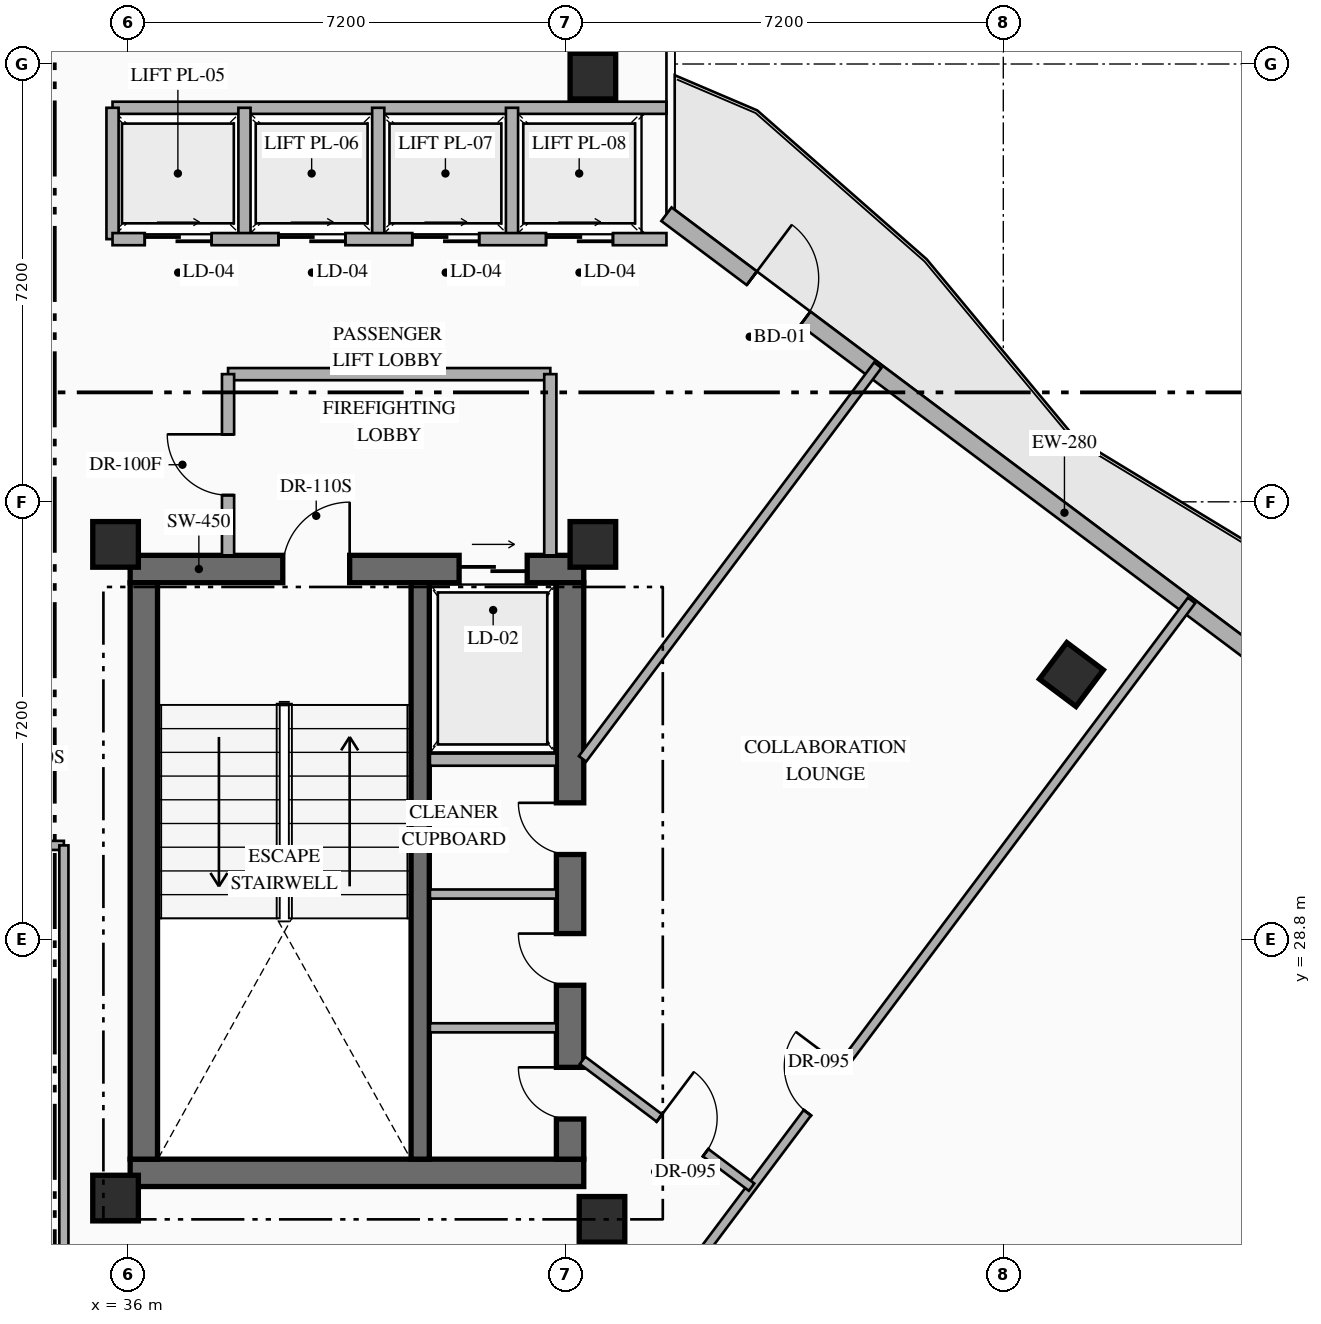
"""IFC4 building model, lengths in metres.
Left out: names, types, materials, properties, quantities, classifications, styles, units other than length and angle.
Written with IfcOpenShell. Run it as: python <this file> out.ifc"""

import sys

from ifc_helpers import new_model, si_unit, direction, frame, frame_2d, origin, origin_2d, place, context, subcontext, project, spatial, rectangle, hollow_rectangle, extrude, element, fill, save


model = new_model("IFC4")
c1 = context("Model", 3, precision=1e-05, world=origin(), true_north=direction((0.0, 1.0)))
c2 = subcontext(c1, "Body", "Model", "MODEL_VIEW")
j1 = project(units=[si_unit("LENGTHUNIT", "METRE"), si_unit("PLANEANGLEUNIT", "RADIAN")], contexts=[c1])
p1 = place(None, origin())
s1 = spatial("IfcSite", under=j1, at=p1, CompositionType="ELEMENT")
p2 = place(p1, origin())
s2 = spatial("IfcBuilding", under=s1, at=p2, CompositionType="ELEMENT")
p3 = place(p2, frame((0.0, 0.0, 205.95)))
s3 = spatial("IfcBuildingStorey", under=s2, at=p3, CompositionType="ELEMENT", Elevation=205.95)
p4 = place(p3, frame((36.04, 24.965, 0.0), z_axis=(0.0, 0.0, 1.0), x_axis=(1.0, 0.0, 0.0)))
e1 = element("IfcWall", 1, at=p4, inside=s3, PredefinedType="SHEAR", context=c2, shape_type="SweptSolid", body=[
    extrude(rectangle(XDim=7.46, YDim=0.45, at=frame_2d((3.73, 0.0))), origin(), (0.0, 0.0, 1.0), 3.6),
])
p5 = place(p3, frame((36.04, 34.895, 0.0), z_axis=(0.0, 0.0, 1.0), x_axis=(1.0, 0.0, 0.0)))
e2 = element("IfcWall", 2, at=p5, inside=s3, PredefinedType="SHEAR", context=c2, shape_type="SweptSolid", body=[
    extrude(rectangle(XDim=7.46, YDim=0.45, at=frame_2d((3.73, 0.0))), origin(), (0.0, 0.0, 1.0), 3.6),
])
p6 = place(p5, frame((2.51, 0.0, 0.0)))
e3 = element("IfcOpeningElement", 3, at=p6, cuts=e2, PredefinedType="OPENING", context=c2, shape_type="SweptSolid", body=[
    extrude(rectangle(XDim=1.1, YDim=2.2, at=frame_2d((0.55, 1.1))), frame((0.0, 0.235, 0.0), z_axis=(0.0, -1.0, 0.0), x_axis=(1.0, 0.0, 0.0)), (0.0, 0.0, 1.0), 0.47),
])
p7 = place(p5, frame((5.41, 0.0, 0.0)))
e4 = element("IfcOpeningElement", 4, at=p7, cuts=e2, PredefinedType="OPENING", context=c2, shape_type="SweptSolid", body=[
    extrude(rectangle(XDim=1.12, YDim=2.15, at=frame_2d((0.56, 1.075))), frame((0.0, 0.235, 0.0), z_axis=(0.0, -1.0, 0.0), x_axis=(1.0, 0.0, 0.0)), (0.0, 0.0, 1.0), 0.47),
])
p8 = place(p3, frame((36.265, 25.19, 0.0), z_axis=(0.0, 0.0, 1.0), x_axis=(0.0, 1.0, 0.0)))
e5 = element("IfcWall", 5, at=p8, inside=s3, PredefinedType="SHEAR", context=c2, shape_type="SweptSolid", body=[
    extrude(rectangle(XDim=9.48, YDim=0.45, at=frame_2d((4.74, 0.0))), origin(), (0.0, 0.0, 1.0), 3.6),
])
p9 = place(p3, frame((43.275, 25.19, 0.0), z_axis=(0.0, 0.0, 1.0), x_axis=(0.0, 1.0, 0.0)))
e6 = element("IfcWall", 6, at=p9, inside=s3, PredefinedType="SHEAR", context=c2, shape_type="SweptSolid", body=[
    extrude(rectangle(XDim=9.48, YDim=0.45, at=frame_2d((4.74, 0.0))), origin(), (0.0, 0.0, 1.0), 3.6),
])
p10 = place(p9, frame((0.66, 0.0, 0.0)))
e7 = element("IfcOpeningElement", 7, at=p10, cuts=e6, PredefinedType="OPENING", context=c2, shape_type="SweptSolid", body=[
    extrude(rectangle(XDim=0.85, YDim=2.08, at=frame_2d((0.425, 1.04))), frame((0.0, 0.235, 0.0), z_axis=(0.0, -1.0, 0.0), x_axis=(1.0, 0.0, 0.0)), (0.0, 0.0, 1.0), 0.47),
])
p11 = place(p9, frame((2.86, 0.0, 0.0)))
e8 = element("IfcOpeningElement", 8, at=p11, cuts=e6, PredefinedType="OPENING", context=c2, shape_type="SweptSolid", body=[
    extrude(rectangle(XDim=0.85, YDim=2.08, at=frame_2d((0.425, 1.04))), frame((0.0, 0.235, 0.0), z_axis=(0.0, -1.0, 0.0), x_axis=(1.0, 0.0, 0.0)), (0.0, 0.0, 1.0), 0.47),
])
p12 = place(p9, frame((5.01, 0.0, 0.0)))
e9 = element("IfcOpeningElement", 9, at=p12, cuts=e6, PredefinedType="OPENING", context=c2, shape_type="SweptSolid", body=[
    extrude(rectangle(XDim=0.85, YDim=2.08, at=frame_2d((0.425, 1.04))), frame((0.0, 0.235, 0.0), z_axis=(0.0, -1.0, 0.0), x_axis=(1.0, 0.0, 0.0)), (0.0, 0.0, 1.0), 0.47),
])
p13 = place(p3, frame((40.81, 25.19, 0.0), z_axis=(0.0, 0.0, 1.0), x_axis=(0.0, 1.0, 0.0)))
e10 = element("IfcWall", 10, at=p13, inside=s3, PredefinedType="SHEAR", context=c2, shape_type="SweptSolid", body=[
    extrude(rectangle(XDim=9.48, YDim=0.3, at=frame_2d((4.74, 0.0))), origin(), (0.0, 0.0, 1.0), 3.6),
])
for number, where, z_axis, x_axis in (
    (11, (35.8, 24.55, 0.0), (0.0, 0.0, 1.0), (1.0, 0.0, 0.0)),
    (12, (43.8, 24.2, 0.0), (0.0, 0.0, 1.0), (1.0, 0.0, 0.0)),
    (13, (35.8, 35.3, 0.0), (0.0, 0.0, 1.0), (1.0, 0.0, 0.0)),
    (14, (43.65, 35.3, 0.0), (0.0, 0.0, 1.0), (1.0, 0.0, 0.0)),
    (15, (43.65, 43.0, 0.0), (0.0, 0.0, 1.0), (1.0, 0.0, 0.0)),
    (16, (51.52, 33.16, 0.0), (0.0, 0.0, 1.0), (0.8, -0.6, 0.0)),
):
    element("IfcColumn", number, at=place(p3, frame(where, z_axis=z_axis, x_axis=x_axis)), inside=s3, PredefinedType="COLUMN", context=c2, shape_type="SweptSolid", body=[
        extrude(hollow_rectangle(XDim=0.75, YDim=0.75, WallThickness=0.028, at=origin_2d()), origin(), (0.0, 0.0, 1.0), 3.6),
    ])
p14 = place(p3, frame((44.86, 40.73, 0.0), z_axis=(0.0, 0.0, 1.0), x_axis=(0.800007624502, -0.599989833863, 0.0)))
e17 = element("IfcWall", 17, at=p14, inside=s3, PredefinedType="STANDARD", context=c2, shape_type="SweptSolid", body=[
    extrude(rectangle(XDim=19.212, YDim=0.28, at=frame_2d((9.606, 0.0))), origin(), (0.0, 0.0, 1.0), 3.35),
])
p15 = place(p14, frame((1.755, 0.0, 0.0)))
e18 = element("IfcOpeningElement", 18, at=p15, cuts=e17, PredefinedType="OPENING", context=c2, shape_type="SweptSolid", body=[
    extrude(rectangle(XDim=1.1, YDim=2.2, at=frame_2d((0.55, 1.1))), frame((0.0, 0.15, 0.0), z_axis=(0.0, -1.0, 0.0), x_axis=(1.0, 0.0, 0.0)), (0.0, 0.0, 1.0), 0.3),
])
p16 = place(p14, frame((13.509, 0.0, 0.85)))
e19 = element("IfcOpeningElement", 19, at=p16, cuts=e17, PredefinedType="OPENING", context=c2, shape_type="SweptSolid", body=[
    extrude(rectangle(XDim=1.8, YDim=2.1, at=frame_2d((0.9, 1.05))), frame((0.0, 0.15, 0.0), z_axis=(0.0, -1.0, 0.0), x_axis=(1.0, 0.0, 0.0)), (0.0, 0.0, 1.0), 0.3),
])
p17 = place(p3, frame((40.97, 31.76, 0.0), z_axis=(0.0, 0.0, 1.0), x_axis=(1.0, 0.0, 0.0)))
e20 = element("IfcWall", 20, at=p17, inside=s3, PredefinedType="STANDARD", context=c2, shape_type="SweptSolid", body=[
    extrude(rectangle(XDim=2.08, YDim=0.2, at=frame_2d((1.04, 0.0))), origin(), (0.0, 0.0, 1.0), 3.35),
])
for number, where, z_axis, x_axis in (
    (21, (40.97, 27.35, 0.0), (0.0, 0.0, 1.0), (1.0, 0.0, 0.0)),
    (22, (40.97, 29.55, 0.0), (0.0, 0.0, 1.0), (1.0, 0.0, 0.0)),
):
    element("IfcWall", number, at=place(p3, frame(where, z_axis=z_axis, x_axis=x_axis)), inside=s3, PredefinedType="PARTITIONING", context=c2, shape_type="SweptSolid", body=[
        extrude(rectangle(XDim=2.08, YDim=0.15, at=frame_2d((1.04, 0.0))), origin(), (0.0, 0.0, 1.0), 3.35),
    ])
p18 = place(p3, frame((37.65, 38.1, 0.0), z_axis=(0.0, 0.0, 1.0), x_axis=(1.0, 0.0, 0.0)))
e23 = element("IfcWall", 23, at=p18, inside=s3, PredefinedType="STANDARD", context=c2, shape_type="SweptSolid", body=[
    extrude(rectangle(XDim=5.3, YDim=0.2, at=frame_2d((2.65, 0.0))), origin(), (0.0, 0.0, 1.0), 3.35),
])
p19 = place(p3, frame((42.95, 35.12, 0.0), z_axis=(0.0, 0.0, 1.0), x_axis=(0.0, 1.0, 0.0)))
e24 = element("IfcWall", 24, at=p19, inside=s3, PredefinedType="STANDARD", context=c2, shape_type="SweptSolid", body=[
    extrude(rectangle(XDim=2.98, YDim=0.2, at=frame_2d((1.49, 0.0))), origin(), (0.0, 0.0, 1.0), 3.35),
])
p20 = place(p3, frame((37.65, 35.12, 0.0), z_axis=(0.0, 0.0, 1.0), x_axis=(0.0, 1.0, 0.0)))
e25 = element("IfcWall", 25, at=p20, inside=s3, PredefinedType="STANDARD", context=c2, shape_type="SweptSolid", body=[
    extrude(rectangle(XDim=2.98, YDim=0.2, at=frame_2d((1.49, 0.0))), origin(), (0.0, 0.0, 1.0), 3.35),
])
p21 = place(p20, frame((0.99, 0.0, 0.0)))
e26 = element("IfcOpeningElement", 26, at=p21, cuts=e25, PredefinedType="OPENING", context=c2, shape_type="SweptSolid", body=[
    extrude(rectangle(XDim=1.0, YDim=2.2, at=frame_2d((0.5, 1.1))), frame((0.0, 0.11, 0.0), z_axis=(0.0, -1.0, 0.0), x_axis=(1.0, 0.0, 0.0)), (0.0, 0.0, 1.0), 0.22),
])
p22 = place(p3, frame((35.75, 42.48, 0.0), z_axis=(0.0, 0.0, 1.0), x_axis=(1.0, 0.0, 0.0)))
e27 = element("IfcWall", 27, at=p22, inside=s3, PredefinedType="STANDARD", context=c2, shape_type="SweptSolid", body=[
    extrude(rectangle(XDim=9.11, YDim=0.2, at=frame_2d((4.555, 0.0))), origin(), (0.0, 0.0, 1.0), 3.35),
])
for number, where, z_axis, x_axis in (
    (28, (35.75, 40.32, 0.0), (0.0, 0.0, 1.0), (0.0, 1.0, 0.0)),
    (29, (37.92, 40.32, 0.0), (0.0, 0.0, 1.0), (0.0, 1.0, 0.0)),
    (30, (40.12, 40.32, 0.0), (0.0, 0.0, 1.0), (0.0, 1.0, 0.0)),
    (31, (42.32, 40.32, 0.0), (0.0, 0.0, 1.0), (0.0, 1.0, 0.0)),
):
    element("IfcWall", number, at=place(p3, frame(where, z_axis=z_axis, x_axis=x_axis)), inside=s3, PredefinedType="STANDARD", context=c2, shape_type="SweptSolid", body=[
        extrude(rectangle(XDim=2.16, YDim=0.2, at=frame_2d((1.08, 0.0))), origin(), (0.0, 0.0, 1.0), 3.35),
    ])
p23 = place(p3, frame((35.75, 40.32, 0.0), z_axis=(0.0, 0.0, 1.0), x_axis=(1.0, 0.0, 0.0)))
e32 = element("IfcWall", 32, at=p23, inside=s3, PredefinedType="STANDARD", context=c2, shape_type="SweptSolid", body=[
    extrude(rectangle(XDim=9.11, YDim=0.2, at=frame_2d((4.555, 0.0))), origin(), (0.0, 0.0, 1.0), 3.35),
])
p24 = place(p23, frame((0.53, 0.0, 0.0)))
e33 = element("IfcOpeningElement", 33, at=p24, cuts=e32, PredefinedType="OPENING", context=c2, shape_type="SweptSolid", body=[
    extrude(rectangle(XDim=1.1, YDim=2.18, at=frame_2d((0.55, 1.09))), frame((0.0, 0.11, 0.0), z_axis=(0.0, -1.0, 0.0), x_axis=(1.0, 0.0, 0.0)), (0.0, 0.0, 1.0), 0.22),
])
p25 = place(p23, frame((2.73, 0.0, 0.0)))
e34 = element("IfcOpeningElement", 34, at=p25, cuts=e32, PredefinedType="OPENING", context=c2, shape_type="SweptSolid", body=[
    extrude(rectangle(XDim=1.1, YDim=2.18, at=frame_2d((0.55, 1.09))), frame((0.0, 0.11, 0.0), z_axis=(0.0, -1.0, 0.0), x_axis=(1.0, 0.0, 0.0)), (0.0, 0.0, 1.0), 0.22),
])
p26 = place(p23, frame((4.93, 0.0, 0.0)))
e35 = element("IfcOpeningElement", 35, at=p26, cuts=e32, PredefinedType="OPENING", context=c2, shape_type="SweptSolid", body=[
    extrude(rectangle(XDim=1.1, YDim=2.18, at=frame_2d((0.55, 1.09))), frame((0.0, 0.11, 0.0), z_axis=(0.0, -1.0, 0.0), x_axis=(1.0, 0.0, 0.0)), (0.0, 0.0, 1.0), 0.22),
])
p27 = place(p23, frame((7.13, 0.0, 0.0)))
e36 = element("IfcOpeningElement", 36, at=p27, cuts=e32, PredefinedType="OPENING", context=c2, shape_type="SweptSolid", body=[
    extrude(rectangle(XDim=1.1, YDim=2.18, at=frame_2d((0.55, 1.09))), frame((0.0, 0.11, 0.0), z_axis=(0.0, -1.0, 0.0), x_axis=(1.0, 0.0, 0.0)), (0.0, 0.0, 1.0), 0.22),
])
p28 = place(p3, frame((25.55, 30.35, 0.0), z_axis=(0.0, 0.0, 1.0), x_axis=(1.0, 0.0, 0.0)))
e37 = element("IfcWall", 37, at=p28, inside=s3, PredefinedType="PARTITIONING", context=c2, shape_type="SweptSolid", body=[
    extrude(rectangle(XDim=9.4, YDim=0.15, at=frame_2d((4.7, 0.0))), origin(), (0.0, 0.0, 1.0), 3.35),
])
p29 = place(p28, frame((7.638, 0.0, 0.0)))
e38 = element("IfcOpeningElement", 38, at=p29, cuts=e37, PredefinedType="OPENING", context=c2, shape_type="SweptSolid", body=[
    extrude(rectangle(XDim=1.0, YDim=2.15, at=frame_2d((0.5, 1.075))), frame((0.0, 0.085, 0.0), z_axis=(0.0, -1.0, 0.0), x_axis=(1.0, 0.0, 0.0)), (0.0, 0.0, 1.0), 0.17),
])
p30 = place(p3, frame((34.95, 23.2, 0.0), z_axis=(0.0, 0.0, 1.0), x_axis=(0.0, 1.0, 0.0)))
e39 = element("IfcWall", 39, at=p30, inside=s3, PredefinedType="PARTITIONING", context=c2, shape_type="SweptSolid", body=[
    extrude(rectangle(XDim=7.15, YDim=0.15, at=frame_2d((3.575, 0.0))), origin(), (0.0, 0.0, 1.0), 3.35),
])
p31 = place(p3, frame((41.43, 18.29, 0.0), z_axis=(0.0, 0.0, 1.0), x_axis=(0.600007769734, 0.79999417264, 0.0)))
e40 = element("IfcWall", 40, at=p31, inside=s3, PredefinedType="PARTITIONING", context=c2, shape_type="SweptSolid", body=[
    extrude(rectangle(XDim=20.11, YDim=0.15, at=frame_2d((10.055, 0.0))), origin(), (0.0, 0.0, 1.0), 3.35),
])
p32 = place(p31, frame((9.58, 0.0, 0.0)))
e41 = element("IfcOpeningElement", 41, at=p32, cuts=e40, PredefinedType="OPENING", context=c2, shape_type="SweptSolid", body=[
    extrude(rectangle(XDim=0.95, YDim=2.15, at=frame_2d((0.475, 1.075))), frame((0.0, 0.085, 0.0), z_axis=(0.0, -1.0, 0.0), x_axis=(1.0, 0.0, 0.0)), (0.0, 0.0, 1.0), 0.17),
])
p33 = place(p3, frame((43.48, 26.815, 0.0), z_axis=(0.0, 0.0, 1.0), x_axis=(0.800008430676, -0.599988758934, 0.0)))
e42 = element("IfcWall", 42, at=p33, inside=s3, PredefinedType="PARTITIONING", context=c2, shape_type="SweptSolid", body=[
    extrude(rectangle(XDim=3.475, YDim=0.15, at=frame_2d((1.738, 0.0))), origin(), (0.0, 0.0, 1.0), 3.35),
])
p34 = place(p33, frame((1.58, 0.0, 0.0)))
e43 = element("IfcOpeningElement", 43, at=p34, cuts=e42, PredefinedType="OPENING", context=c2, shape_type="SweptSolid", body=[
    extrude(rectangle(XDim=0.95, YDim=2.15, at=frame_2d((0.475, 1.075))), frame((0.0, 0.085, 0.0), z_axis=(0.0, -1.0, 0.0), x_axis=(1.0, 0.0, 0.0)), (0.0, 0.0, 1.0), 0.17),
])
p35 = place(p3, frame((43.48, 31.773, 0.0), z_axis=(0.0, 0.0, 1.0), x_axis=(0.599971041729, 0.800021717885, 0.0)))
e44 = element("IfcWall", 44, at=p35, inside=s3, PredefinedType="PARTITIONING", context=c2, shape_type="SweptSolid", body=[
    extrude(rectangle(XDim=8.094, YDim=0.15, at=frame_2d((4.047, 0.0))), origin(), (0.0, 0.0, 1.0), 3.35),
])
p36 = place(p3, frame((27.91, 26.68, 0.0), z_axis=(0.0, 0.0, 1.0), x_axis=(0.800005938517, -0.599992081896, 0.0)))
e45 = element("IfcWall", 45, at=p36, inside=s3, PredefinedType="PARTITIONING", context=c2, shape_type="SweptSolid", body=[
    extrude(rectangle(XDim=14.8, YDim=0.15, at=frame_2d((7.4, 0.0))), origin(), (0.0, 0.0, 1.0), 3.35),
])
p37 = place(p36, frame((9.281, 0.0, 0.0)))
e46 = element("IfcOpeningElement", 46, at=p37, cuts=e45, PredefinedType="OPENING", context=c2, shape_type="SweptSolid", body=[
    extrude(rectangle(XDim=0.95, YDim=2.15, at=frame_2d((0.475, 1.075))), frame((0.0, 0.085, 0.0), z_axis=(0.0, -1.0, 0.0), x_axis=(1.0, 0.0, 0.0)), (0.0, 0.0, 1.0), 0.17),
])
p38 = place(p15, origin())
e47 = element("IfcDoor", 47, at=p38, inside=s3, OperationType="SINGLE_SWING_LEFT", PredefinedType="DOOR", context=c2, shape_type="SweptSolid", body=[
    extrude(rectangle(XDim=1.1, YDim=2.2, at=frame_2d((0.55, 1.1))), frame((0.0, 0.025, 0.0), z_axis=(0.0, -1.0, 0.0), x_axis=(1.0, 0.0, 0.0)), (0.0, 0.0, 1.0), 0.05),
])
fill(e18, e47)
p39 = place(p6, origin())
e48 = element("IfcDoor", 48, at=p39, inside=s3, OperationType="SINGLE_SWING_RIGHT", PredefinedType="DOOR", context=c2, shape_type="SweptSolid", body=[
    extrude(rectangle(XDim=1.1, YDim=2.2, at=frame_2d((0.55, 1.1))), frame((0.0, 0.025, 0.0), z_axis=(0.0, -1.0, 0.0), x_axis=(1.0, 0.0, 0.0)), (0.0, 0.0, 1.0), 0.05),
])
fill(e3, e48)
p40 = place(p7, origin())
e49 = element("IfcDoor", 49, at=p40, inside=s3, OperationType="SLIDING_TO_RIGHT", PredefinedType="USERDEFINED", context=c2, shape_type="SweptSolid", body=[
    extrude(rectangle(XDim=1.12, YDim=2.15, at=frame_2d((0.56, 1.075))), frame((0.0, 0.025, 0.0), z_axis=(0.0, -1.0, 0.0), x_axis=(1.0, 0.0, 0.0)), (0.0, 0.0, 1.0), 0.05),
])
fill(e4, e49)
p41 = place(p10, origin())
e50 = element("IfcDoor", 50, at=p41, inside=s3, OperationType="SINGLE_SWING_RIGHT", PredefinedType="DOOR", context=c2, shape_type="SweptSolid", body=[
    extrude(rectangle(XDim=0.85, YDim=2.08, at=frame_2d((0.425, 1.04))), frame((0.0, 0.025, 0.0), z_axis=(0.0, -1.0, 0.0), x_axis=(1.0, 0.0, 0.0)), (0.0, 0.0, 1.0), 0.05),
])
fill(e7, e50)
p42 = place(p11, origin())
e51 = element("IfcDoor", 51, at=p42, inside=s3, OperationType="SINGLE_SWING_RIGHT", PredefinedType="DOOR", context=c2, shape_type="SweptSolid", body=[
    extrude(rectangle(XDim=0.85, YDim=2.08, at=frame_2d((0.425, 1.04))), frame((0.0, 0.025, 0.0), z_axis=(0.0, -1.0, 0.0), x_axis=(1.0, 0.0, 0.0)), (0.0, 0.0, 1.0), 0.05),
])
fill(e8, e51)
p43 = place(p12, origin())
e52 = element("IfcDoor", 52, at=p43, inside=s3, OperationType="SINGLE_SWING_RIGHT", PredefinedType="DOOR", context=c2, shape_type="SweptSolid", body=[
    extrude(rectangle(XDim=0.85, YDim=2.08, at=frame_2d((0.425, 1.04))), frame((0.0, 0.025, 0.0), z_axis=(0.0, -1.0, 0.0), x_axis=(1.0, 0.0, 0.0)), (0.0, 0.0, 1.0), 0.05),
])
fill(e9, e52)
p44 = place(p21, origin())
e53 = element("IfcDoor", 53, at=p44, inside=s3, OperationType="SINGLE_SWING_RIGHT", PredefinedType="DOOR", context=c2, shape_type="SweptSolid", body=[
    extrude(rectangle(XDim=1.0, YDim=2.2, at=frame_2d((0.5, 1.1))), frame((0.0, 0.025, 0.0), z_axis=(0.0, -1.0, 0.0), x_axis=(1.0, 0.0, 0.0)), (0.0, 0.0, 1.0), 0.05),
])
fill(e26, e53)
p45 = place(p24, origin())
e54 = element("IfcDoor", 54, at=p45, inside=s3, OperationType="SLIDING_TO_RIGHT", PredefinedType="USERDEFINED", context=c2, shape_type="SweptSolid", body=[
    extrude(rectangle(XDim=1.1, YDim=2.18, at=frame_2d((0.55, 1.09))), frame((0.0, 0.025, 0.0), z_axis=(0.0, -1.0, 0.0), x_axis=(1.0, 0.0, 0.0)), (0.0, 0.0, 1.0), 0.05),
])
fill(e33, e54)
p46 = place(p25, origin())
e55 = element("IfcDoor", 55, at=p46, inside=s3, OperationType="SLIDING_TO_RIGHT", PredefinedType="USERDEFINED", context=c2, shape_type="SweptSolid", body=[
    extrude(rectangle(XDim=1.1, YDim=2.18, at=frame_2d((0.55, 1.09))), frame((0.0, 0.025, 0.0), z_axis=(0.0, -1.0, 0.0), x_axis=(1.0, 0.0, 0.0)), (0.0, 0.0, 1.0), 0.05),
])
fill(e34, e55)
p47 = place(p26, origin())
e56 = element("IfcDoor", 56, at=p47, inside=s3, OperationType="SLIDING_TO_RIGHT", PredefinedType="USERDEFINED", context=c2, shape_type="SweptSolid", body=[
    extrude(rectangle(XDim=1.1, YDim=2.18, at=frame_2d((0.55, 1.09))), frame((0.0, 0.025, 0.0), z_axis=(0.0, -1.0, 0.0), x_axis=(1.0, 0.0, 0.0)), (0.0, 0.0, 1.0), 0.05),
])
fill(e35, e56)
p48 = place(p27, origin())
e57 = element("IfcDoor", 57, at=p48, inside=s3, OperationType="SLIDING_TO_RIGHT", PredefinedType="USERDEFINED", context=c2, shape_type="SweptSolid", body=[
    extrude(rectangle(XDim=1.1, YDim=2.18, at=frame_2d((0.55, 1.09))), frame((0.0, 0.025, 0.0), z_axis=(0.0, -1.0, 0.0), x_axis=(1.0, 0.0, 0.0)), (0.0, 0.0, 1.0), 0.05),
])
fill(e36, e57)
p49 = place(p32, origin())
e58 = element("IfcDoor", 58, at=p49, inside=s3, OperationType="SINGLE_SWING_RIGHT", PredefinedType="DOOR", context=c2, shape_type="SweptSolid", body=[
    extrude(rectangle(XDim=0.95, YDim=2.15, at=frame_2d((0.475, 1.075))), frame((0.0, 0.025, 0.0), z_axis=(0.0, -1.0, 0.0), x_axis=(1.0, 0.0, 0.0)), (0.0, 0.0, 1.0), 0.05),
])
fill(e41, e58)
p50 = place(p34, origin())
e59 = element("IfcDoor", 59, at=p50, inside=s3, OperationType="SINGLE_SWING_LEFT", PredefinedType="DOOR", context=c2, shape_type="SweptSolid", body=[
    extrude(rectangle(XDim=0.95, YDim=2.15, at=frame_2d((0.475, 1.075))), frame((0.0, 0.025, 0.0), z_axis=(0.0, -1.0, 0.0), x_axis=(1.0, 0.0, 0.0)), (0.0, 0.0, 1.0), 0.05),
])
fill(e43, e59)
save(model, sys.argv[1])
